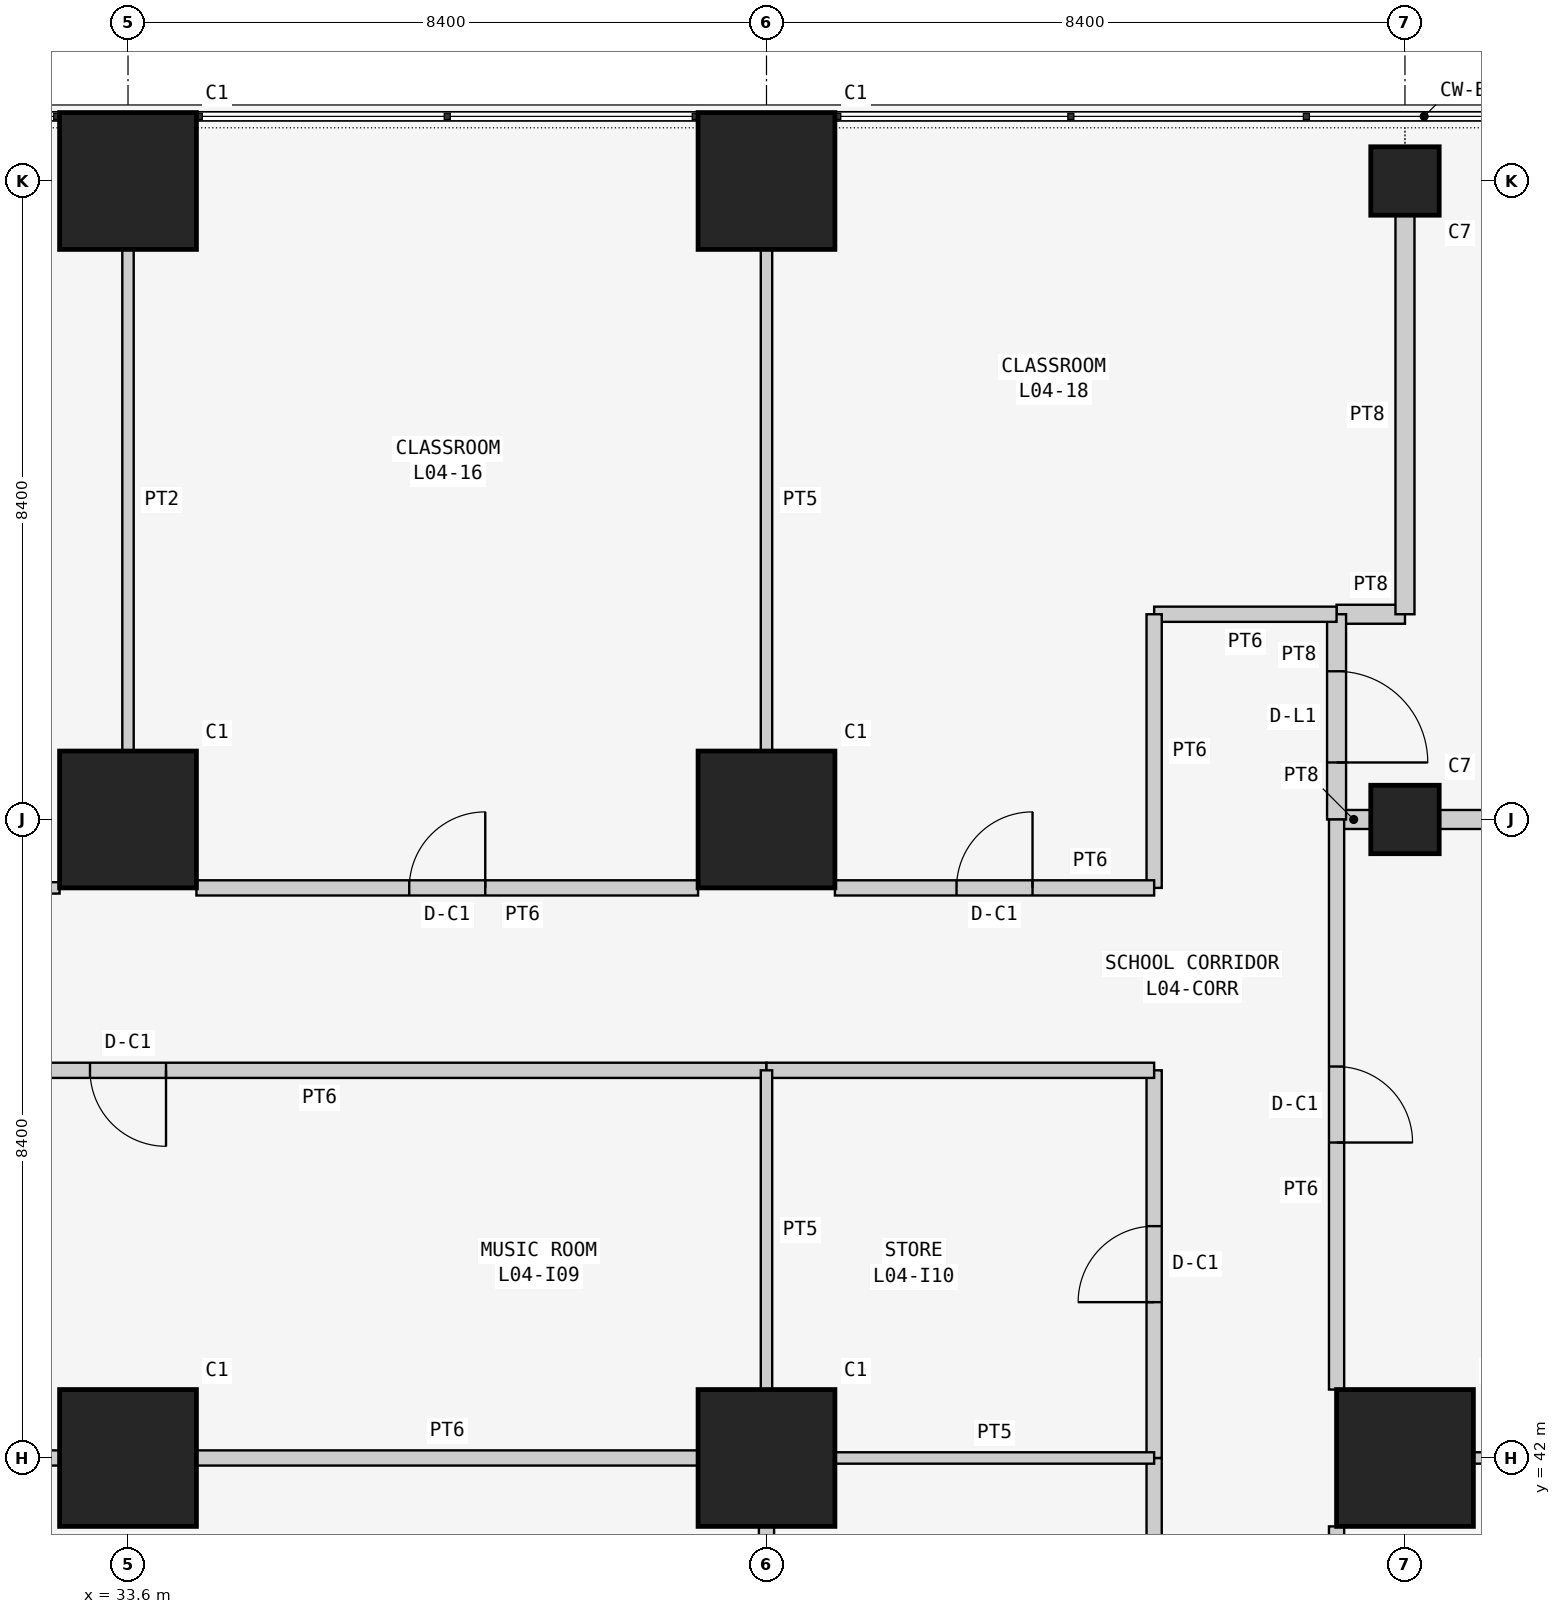
"""IFC4 building model, lengths in metres.
Left out: names, types, materials, properties, quantities, classifications, styles, units other than length and angle.
Written with IfcOpenShell. Run it as: python <this file> out.ifc"""

import sys

from ifc_helpers import new_model, si_unit, direction, frame, frame_2d, origin, origin_2d, place, context, subcontext, project, spatial, rectangle, extrude, element, fill, save


model = new_model("IFC4")
c1 = context("Model", 3, precision=1e-05, world=origin(), true_north=direction((0.0, 1.0)))
c2 = subcontext(c1, "Body", "Model", "MODEL_VIEW")
j1 = project(units=[si_unit("LENGTHUNIT", "METRE"), si_unit("PLANEANGLEUNIT", "RADIAN")], contexts=[c1])
p1 = place(None, origin())
s1 = spatial("IfcSite", under=j1, at=p1, CompositionType="ELEMENT")
p2 = place(p1, origin())
s2 = spatial("IfcBuilding", under=s1, at=p2, CompositionType="ELEMENT")
p3 = place(p2, frame((0.0, 0.0, 19.5)))
s3 = spatial("IfcBuildingStorey", under=s2, at=p3, CompositionType="ELEMENT", Elevation=19.5)
for number, where, z_axis, x_axis in (
    (1, (33.6, 42.0, 0.0), (0.0, 0.0, 1.0), (1.0, 0.0, 0.0)),
    (2, (33.6, 50.4, 0.0), (0.0, 0.0, 1.0), (1.0, 0.0, 0.0)),
    (3, (33.6, 58.8, 0.0), (0.0, 0.0, 1.0), (1.0, 0.0, 0.0)),
    (4, (42.0, 42.0, 0.0), (0.0, 0.0, 1.0), (1.0, 0.0, 0.0)),
    (5, (42.0, 50.4, 0.0), (0.0, 0.0, 1.0), (1.0, 0.0, 0.0)),
    (6, (42.0, 58.8, 0.0), (0.0, 0.0, 1.0), (1.0, 0.0, 0.0)),
    (7, (50.4, 42.0, 0.0), (0.0, 0.0, 1.0), (1.0, 0.0, 0.0)),
):
    element("IfcColumn", number, at=place(p3, frame(where, z_axis=z_axis, x_axis=x_axis)), inside=s3, PredefinedType="COLUMN", context=c2, shape_type="SweptSolid", body=[
        extrude(rectangle(XDim=1.8, YDim=1.8, at=origin_2d()), origin(), (0.0, 0.0, 1.0), 4.5),
    ])
for number, where, z_axis, x_axis in (
    (8, (50.4, 50.4, 0.0), (0.0, 0.0, 1.0), (1.0, 0.0, 0.0)),
    (9, (50.4, 58.8, 0.0), (0.0, 0.0, 1.0), (1.0, 0.0, 0.0)),
):
    element("IfcColumn", number, at=place(p3, frame(where, z_axis=z_axis, x_axis=x_axis)), inside=s3, PredefinedType="COLUMN", context=c2, shape_type="SweptSolid", body=[
        extrude(rectangle(XDim=0.9, YDim=0.9, at=origin_2d()), origin(), (0.0, 0.0, 1.0), 4.5),
    ])
p4 = place(p3, frame((33.6, 57.9, 0.0), z_axis=(0.0, 0.0, 1.0), x_axis=(0.0, -1.0, 0.0)))
e10 = element("IfcWall", 10, at=p4, inside=s3, PredefinedType="PARTITIONING", context=c2, shape_type="SweptSolid", body=[
    extrude(rectangle(XDim=6.6, YDim=0.15, at=frame_2d((3.3, 0.0))), origin(), (0.0, 0.0, 1.0), 3.543),
])
p5 = place(p3, frame((32.7, 49.5, 0.0), z_axis=(0.0, 0.0, 1.0), x_axis=(-1.0, 0.0, 0.0)))
e11 = element("IfcWall", 11, at=p5, inside=s3, PredefinedType="PARTITIONING", context=c2, shape_type="SweptSolid", body=[
    extrude(rectangle(XDim=2.2, YDim=0.15, at=frame_2d((1.1, 0.0))), origin(), (0.0, 0.0, 1.0), 4.3),
])
p6 = place(p5, frame((0.65, 0.0, 0.0)))
e12 = element("IfcOpeningElement", 12, at=p6, cuts=e11, PredefinedType="OPENING", context=c2, shape_type="SweptSolid", body=[
    extrude(rectangle(XDim=0.9, YDim=2.1, at=frame_2d((0.45, 1.05))), frame((0.0, 0.085, 0.0), z_axis=(0.0, -1.0, 0.0), x_axis=(1.0, 0.0, 0.0)), (0.0, 0.0, 1.0), 0.17),
])
p7 = place(p3, frame((49.95, 50.4, 0.0), z_axis=(0.0, 0.0, 1.0), x_axis=(-1.0, 0.0, 0.0)))
e13 = element("IfcWall", 13, at=p7, inside=s3, PredefinedType="SOLIDWALL", context=c2, shape_type="SweptSolid", body=[
    extrude(rectangle(XDim=0.45, YDim=0.25, at=frame_2d((0.225, 0.0))), origin(), (0.0, 0.0, 1.0), 3.543),
])
p8 = place(p3, frame((58.35, 50.4, 0.0), z_axis=(0.0, 0.0, 1.0), x_axis=(-1.0, 0.0, 0.0)))
e14 = element("IfcWall", 14, at=p8, inside=s3, PredefinedType="SOLIDWALL", context=c2, shape_type="SweptSolid", body=[
    extrude(rectangle(XDim=7.5, YDim=0.25, at=frame_2d((3.75, 0.0))), origin(), (0.0, 0.0, 1.0), 3.543),
])
p9 = place(p3, frame((49.5, 53.1, 0.0), z_axis=(0.0, 0.0, 1.0), x_axis=(1.0, 0.0, 0.0)))
e15 = element("IfcWall", 15, at=p9, inside=s3, PredefinedType="SOLIDWALL", context=c2, shape_type="SweptSolid", body=[
    extrude(rectangle(XDim=0.9, YDim=0.25, at=frame_2d((0.45, 0.0))), origin(), (0.0, 0.0, 1.0), 4.3),
])
p10 = place(p3, frame((50.4, 53.1, 0.0), z_axis=(0.0, 0.0, 1.0), x_axis=(0.0, 1.0, 0.0)))
e16 = element("IfcWall", 16, at=p10, inside=s3, PredefinedType="SOLIDWALL", context=c2, shape_type="SweptSolid", body=[
    extrude(rectangle(XDim=5.25, YDim=0.25, at=frame_2d((2.625, 0.0))), origin(), (0.0, 0.0, 1.0), 3.543),
])
p11 = place(p3, frame((49.5, 50.4, 0.0), z_axis=(0.0, 0.0, 1.0), x_axis=(0.0, 1.0, 0.0)))
e17 = element("IfcWall", 17, at=p11, inside=s3, PredefinedType="SOLIDWALL", context=c2, shape_type="SweptSolid", body=[
    extrude(rectangle(XDim=2.7, YDim=0.25, at=frame_2d((1.35, 0.0))), origin(), (0.0, 0.0, 1.0), 4.3),
])
p12 = place(p11, frame((0.75, 0.0, 0.0)))
e18 = element("IfcOpeningElement", 18, at=p12, cuts=e17, PredefinedType="OPENING", context=c2, shape_type="SweptSolid", body=[
    extrude(rectangle(XDim=1.2, YDim=2.1, at=frame_2d((0.6, 1.05))), frame((0.0, 0.135, 0.0), z_axis=(0.0, -1.0, 0.0), x_axis=(1.0, 0.0, 0.0)), (0.0, 0.0, 1.0), 0.27),
])
p13 = place(p3, frame((51.3, 42.0, 0.0), z_axis=(0.0, 0.0, 1.0), x_axis=(1.0, 0.0, 0.0)))
e19 = element("IfcWall", 19, at=p13, inside=s3, PredefinedType="PARTITIONING", context=c2, shape_type="SweptSolid", body=[
    extrude(rectangle(XDim=6.6, YDim=0.15, at=frame_2d((3.3, 0.0))), origin(), (0.0, 0.0, 1.0), 3.543),
])
p14 = place(p3, frame((49.5, 34.5, 0.0), z_axis=(0.0, 0.0, 1.0), x_axis=(0.0, 1.0, 0.0)))
e20 = element("IfcWall", 20, at=p14, inside=s3, PredefinedType="PARTITIONING", context=c2, shape_type="SweptSolid", body=[
    extrude(rectangle(XDim=6.6, YDim=0.2, at=frame_2d((3.3, 0.0))), origin(), (0.0, 0.0, 1.0), 4.3),
])
p15 = place(p14, frame((2.8, 0.0, 0.0)))
e21 = element("IfcOpeningElement", 21, at=p15, cuts=e20, PredefinedType="OPENING", context=c2, shape_type="SweptSolid", body=[
    extrude(rectangle(XDim=1.0, YDim=2.1, at=frame_2d((0.5, 1.05))), frame((0.0, 0.11, 0.0), z_axis=(0.0, -1.0, 0.0), x_axis=(1.0, 0.0, 0.0)), (0.0, 0.0, 1.0), 0.22),
])
p16 = place(p3, frame((49.5, 42.9, 0.0), z_axis=(0.0, 0.0, 1.0), x_axis=(0.0, 1.0, 0.0)))
e22 = element("IfcWall", 22, at=p16, inside=s3, PredefinedType="PARTITIONING", context=c2, shape_type="SweptSolid", body=[
    extrude(rectangle(XDim=7.5, YDim=0.2, at=frame_2d((3.75, 0.0))), origin(), (0.0, 0.0, 1.0), 4.3),
])
p17 = place(p16, frame((3.25, 0.0, 0.0)))
e23 = element("IfcOpeningElement", 23, at=p17, cuts=e22, PredefinedType="OPENING", context=c2, shape_type="SweptSolid", body=[
    extrude(rectangle(XDim=1.0, YDim=2.1, at=frame_2d((0.5, 1.05))), frame((0.0, 0.11, 0.0), z_axis=(0.0, -1.0, 0.0), x_axis=(1.0, 0.0, 0.0)), (0.0, 0.0, 1.0), 0.22),
])
p18 = place(p3, frame((42.0, 57.9, 0.0), z_axis=(0.0, 0.0, 1.0), x_axis=(0.0, -1.0, 0.0)))
e24 = element("IfcWall", 24, at=p18, inside=s3, PredefinedType="PARTITIONING", context=c2, shape_type="SweptSolid", body=[
    extrude(rectangle(XDim=6.6, YDim=0.15, at=frame_2d((3.3, 0.0))), origin(), (0.0, 0.0, 1.0), 3.543),
])
p19 = place(p3, frame((41.1, 49.5, 0.0), z_axis=(0.0, 0.0, 1.0), x_axis=(-1.0, 0.0, 0.0)))
e25 = element("IfcWall", 25, at=p19, inside=s3, PredefinedType="PARTITIONING", context=c2, shape_type="SweptSolid", body=[
    extrude(rectangle(XDim=6.6, YDim=0.2, at=frame_2d((3.3, 0.0))), origin(), (0.0, 0.0, 1.0), 4.3),
])
p20 = place(p19, frame((2.8, 0.0, 0.0)))
e26 = element("IfcOpeningElement", 26, at=p20, cuts=e25, PredefinedType="OPENING", context=c2, shape_type="SweptSolid", body=[
    extrude(rectangle(XDim=1.0, YDim=2.1, at=frame_2d((0.5, 1.05))), frame((0.0, 0.11, 0.0), z_axis=(0.0, -1.0, 0.0), x_axis=(1.0, 0.0, 0.0)), (0.0, 0.0, 1.0), 0.22),
])
p21 = place(p3, frame((49.5, 53.1, 0.0), z_axis=(0.0, 0.0, 1.0), x_axis=(-1.0, 0.0, 0.0)))
e27 = element("IfcWall", 27, at=p21, inside=s3, PredefinedType="PARTITIONING", context=c2, shape_type="SweptSolid", body=[
    extrude(rectangle(XDim=2.4, YDim=0.2, at=frame_2d((1.2, 0.0))), origin(), (0.0, 0.0, 1.0), 4.3),
])
p22 = place(p3, frame((47.1, 53.1, 0.0), z_axis=(0.0, 0.0, 1.0), x_axis=(0.0, -1.0, 0.0)))
e28 = element("IfcWall", 28, at=p22, inside=s3, PredefinedType="PARTITIONING", context=c2, shape_type="SweptSolid", body=[
    extrude(rectangle(XDim=3.6, YDim=0.2, at=frame_2d((1.8, 0.0))), origin(), (0.0, 0.0, 1.0), 4.3),
])
p23 = place(p3, frame((47.1, 49.5, 0.0), z_axis=(0.0, 0.0, 1.0), x_axis=(-1.0, 0.0, 0.0)))
e29 = element("IfcWall", 29, at=p23, inside=s3, PredefinedType="PARTITIONING", context=c2, shape_type="SweptSolid", body=[
    extrude(rectangle(XDim=4.2, YDim=0.2, at=frame_2d((2.1, 0.0))), origin(), (0.0, 0.0, 1.0), 4.3),
])
p24 = place(p23, frame((1.6, 0.0, 0.0)))
e30 = element("IfcOpeningElement", 30, at=p24, cuts=e29, PredefinedType="OPENING", context=c2, shape_type="SweptSolid", body=[
    extrude(rectangle(XDim=1.0, YDim=2.1, at=frame_2d((0.5, 1.05))), frame((0.0, 0.11, 0.0), z_axis=(0.0, -1.0, 0.0), x_axis=(1.0, 0.0, 0.0)), (0.0, 0.0, 1.0), 0.22),
])
p25 = place(p3, frame((47.1, 33.6, 0.0), z_axis=(0.0, 0.0, 1.0), x_axis=(0.0, 1.0, 0.0)))
e31 = element("IfcWall", 31, at=p25, inside=s3, PredefinedType="PARTITIONING", context=c2, shape_type="SweptSolid", body=[
    extrude(rectangle(XDim=8.4, YDim=0.2, at=frame_2d((4.2, 0.0))), origin(), (0.0, 0.0, 1.0), 4.3),
])
p26 = place(p25, frame((3.7, 0.0, 0.0)))
e32 = element("IfcOpeningElement", 32, at=p26, cuts=e31, PredefinedType="OPENING", context=c2, shape_type="SweptSolid", body=[
    extrude(rectangle(XDim=1.0, YDim=2.1, at=frame_2d((0.5, 1.05))), frame((0.0, 0.11, 0.0), z_axis=(0.0, -1.0, 0.0), x_axis=(1.0, 0.0, 0.0)), (0.0, 0.0, 1.0), 0.22),
])
p27 = place(p3, frame((42.0, 47.1, 0.0), z_axis=(0.0, 0.0, 1.0), x_axis=(-1.0, 0.0, 0.0)))
e33 = element("IfcWall", 33, at=p27, inside=s3, PredefinedType="PARTITIONING", context=c2, shape_type="SweptSolid", body=[
    extrude(rectangle(XDim=16.8, YDim=0.2, at=frame_2d((8.4, 0.0))), origin(), (0.0, 0.0, 1.0), 4.3),
])
p28 = place(p27, frame((7.9, 0.0, 0.0)))
e34 = element("IfcOpeningElement", 34, at=p28, cuts=e33, PredefinedType="OPENING", context=c2, shape_type="SweptSolid", body=[
    extrude(rectangle(XDim=1.0, YDim=2.1, at=frame_2d((0.5, 1.05))), frame((0.0, 0.11, 0.0), z_axis=(0.0, -1.0, 0.0), x_axis=(1.0, 0.0, 0.0)), (0.0, 0.0, 1.0), 0.22),
])
p29 = place(p3, frame((47.1, 42.0, 0.0), z_axis=(0.0, 0.0, 1.0), x_axis=(0.0, 1.0, 0.0)))
e35 = element("IfcWall", 35, at=p29, inside=s3, PredefinedType="PARTITIONING", context=c2, shape_type="SweptSolid", body=[
    extrude(rectangle(XDim=5.1, YDim=0.2, at=frame_2d((2.55, 0.0))), origin(), (0.0, 0.0, 1.0), 4.3),
])
p30 = place(p29, frame((2.05, 0.0, 0.0)))
e36 = element("IfcOpeningElement", 36, at=p30, cuts=e35, PredefinedType="OPENING", context=c2, shape_type="SweptSolid", body=[
    extrude(rectangle(XDim=1.0, YDim=2.1, at=frame_2d((0.5, 1.05))), frame((0.0, 0.11, 0.0), z_axis=(0.0, -1.0, 0.0), x_axis=(1.0, 0.0, 0.0)), (0.0, 0.0, 1.0), 0.22),
])
p31 = place(p3, frame((47.1, 47.1, 0.0), z_axis=(0.0, 0.0, 1.0), x_axis=(-1.0, 0.0, 0.0)))
e37 = element("IfcWall", 37, at=p31, inside=s3, PredefinedType="PARTITIONING", context=c2, shape_type="SweptSolid", body=[
    extrude(rectangle(XDim=5.1, YDim=0.2, at=frame_2d((2.55, 0.0))), origin(), (0.0, 0.0, 1.0), 4.3),
])
p32 = place(p3, frame((42.0, 41.1, 0.0), z_axis=(0.0, 0.0, 1.0), x_axis=(0.0, -1.0, 0.0)))
e38 = element("IfcWall", 38, at=p32, inside=s3, PredefinedType="PARTITIONING", context=c2, shape_type="SweptSolid", body=[
    extrude(rectangle(XDim=6.6, YDim=0.2, at=frame_2d((3.3, 0.0))), origin(), (0.0, 0.0, 1.0), 3.543),
])
p33 = place(p3, frame((26.1, 42.0, 0.0), z_axis=(0.0, 0.0, 1.0), x_axis=(1.0, 0.0, 0.0)))
e39 = element("IfcWall", 39, at=p33, inside=s3, PredefinedType="PARTITIONING", context=c2, shape_type="SweptSolid", body=[
    extrude(rectangle(XDim=6.6, YDim=0.2, at=frame_2d((3.3, 0.0))), origin(), (0.0, 0.0, 1.0), 3.543),
])
p34 = place(p3, frame((34.5, 42.0, 0.0), z_axis=(0.0, 0.0, 1.0), x_axis=(1.0, 0.0, 0.0)))
e40 = element("IfcWall", 40, at=p34, inside=s3, PredefinedType="PARTITIONING", context=c2, shape_type="SweptSolid", body=[
    extrude(rectangle(XDim=6.6, YDim=0.2, at=frame_2d((3.3, 0.0))), origin(), (0.0, 0.0, 1.0), 3.543),
])
for number, where, z_axis, x_axis in (
    (41, (42.9, 42.0, 0.0), (0.0, 0.0, 1.0), (1.0, 0.0, 0.0)),
    (42, (42.0, 47.1, 0.0), (0.0, 0.0, 1.0), (0.0, -1.0, 0.0)),
):
    element("IfcWall", number, at=place(p3, frame(where, z_axis=z_axis, x_axis=x_axis)), inside=s3, PredefinedType="PARTITIONING", context=c2, shape_type="SweptSolid", body=[
        extrude(rectangle(XDim=4.2, YDim=0.15, at=frame_2d((2.1, 0.0))), origin(), (0.0, 0.0, 1.0), 3.543),
    ])
p35 = place(p12, frame((1.2, 0.0, 0.0), z_axis=(0.0, 0.0, 1.0), x_axis=(-1.0, 0.0, 0.0)))
e43 = element("IfcDoor", 43, at=p35, inside=s3, OperationType="SINGLE_SWING_RIGHT", PredefinedType="DOOR", context=c2, shape_type="SweptSolid", body=[
    extrude(rectangle(XDim=1.2, YDim=2.1, at=frame_2d((0.6, 1.05))), frame((0.0, 0.025, 0.0), z_axis=(0.0, -1.0, 0.0), x_axis=(1.0, 0.0, 0.0)), (0.0, 0.0, 1.0), 0.05),
])
fill(e18, e43)
p36 = place(p17, frame((1.0, 0.0, 0.0), z_axis=(0.0, 0.0, 1.0), x_axis=(-1.0, 0.0, 0.0)))
e44 = element("IfcDoor", 44, at=p36, inside=s3, OperationType="SINGLE_SWING_RIGHT", PredefinedType="DOOR", context=c2, shape_type="SweptSolid", body=[
    extrude(rectangle(XDim=1.0, YDim=2.1, at=frame_2d((0.5, 1.05))), frame((0.0, 0.025, 0.0), z_axis=(0.0, -1.0, 0.0), x_axis=(1.0, 0.0, 0.0)), (0.0, 0.0, 1.0), 0.05),
])
fill(e23, e44)
p37 = place(p20, frame((1.0, 0.0, 0.0), z_axis=(0.0, 0.0, 1.0), x_axis=(-1.0, 0.0, 0.0)))
e45 = element("IfcDoor", 45, at=p37, inside=s3, OperationType="SINGLE_SWING_RIGHT", PredefinedType="DOOR", context=c2, shape_type="SweptSolid", body=[
    extrude(rectangle(XDim=1.0, YDim=2.1, at=frame_2d((0.5, 1.05))), frame((0.0, 0.025, 0.0), z_axis=(0.0, -1.0, 0.0), x_axis=(1.0, 0.0, 0.0)), (0.0, 0.0, 1.0), 0.05),
])
fill(e26, e45)
p38 = place(p24, frame((1.0, 0.0, 0.0), z_axis=(0.0, 0.0, 1.0), x_axis=(-1.0, 0.0, 0.0)))
e46 = element("IfcDoor", 46, at=p38, inside=s3, OperationType="SINGLE_SWING_RIGHT", PredefinedType="DOOR", context=c2, shape_type="SweptSolid", body=[
    extrude(rectangle(XDim=1.0, YDim=2.1, at=frame_2d((0.5, 1.05))), frame((0.0, 0.025, 0.0), z_axis=(0.0, -1.0, 0.0), x_axis=(1.0, 0.0, 0.0)), (0.0, 0.0, 1.0), 0.05),
])
fill(e30, e46)
p39 = place(p28, origin())
e47 = element("IfcDoor", 47, at=p39, inside=s3, OperationType="SINGLE_SWING_LEFT", PredefinedType="DOOR", context=c2, shape_type="SweptSolid", body=[
    extrude(rectangle(XDim=1.0, YDim=2.1, at=frame_2d((0.5, 1.05))), frame((0.0, 0.025, 0.0), z_axis=(0.0, -1.0, 0.0), x_axis=(1.0, 0.0, 0.0)), (0.0, 0.0, 1.0), 0.05),
])
fill(e34, e47)
p40 = place(p30, origin())
e48 = element("IfcDoor", 48, at=p40, inside=s3, OperationType="SINGLE_SWING_LEFT", PredefinedType="DOOR", context=c2, shape_type="SweptSolid", body=[
    extrude(rectangle(XDim=1.0, YDim=2.1, at=frame_2d((0.5, 1.05))), frame((0.0, 0.025, 0.0), z_axis=(0.0, -1.0, 0.0), x_axis=(1.0, 0.0, 0.0)), (0.0, 0.0, 1.0), 0.05),
])
fill(e36, e48)
save(model, sys.argv[1])
